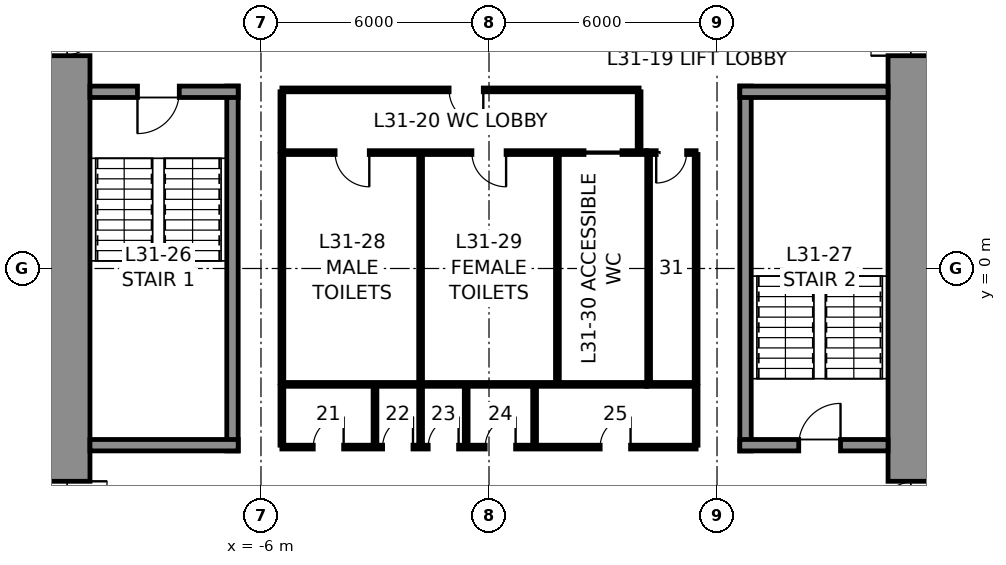
"""IFC4 building model, lengths in metres.
Left out: names, types, materials, properties, quantities, classifications, styles, units other than length and angle.
Written with IfcOpenShell. Run it as: python <this file> out.ifc"""

import sys

from ifc_helpers import new_model, si_unit, direction, frame, frame_2d, origin, place, context, subcontext, project, spatial, rectangle, extrude, element, fill, save


model = new_model("IFC4")
c1 = context("Model", 3, precision=1e-05, world=origin(), true_north=direction((0.0, 1.0)))
c2 = subcontext(c1, "Body", "Model", "MODEL_VIEW")
j1 = project(units=[si_unit("LENGTHUNIT", "METRE"), si_unit("PLANEANGLEUNIT", "RADIAN")], contexts=[c1])
p1 = place(None, origin())
s1 = spatial("IfcSite", under=j1, at=p1, CompositionType="ELEMENT")
p2 = place(p1, origin())
s2 = spatial("IfcBuilding", under=s1, at=p2, CompositionType="ELEMENT")
p3 = place(p2, frame((0.0, 0.0, 151.8)))
s3 = spatial("IfcBuildingStorey", under=s2, at=p3, CompositionType="ELEMENT", Elevation=151.8)
p4 = place(p3, frame((11.25, 10.5, 0.0), z_axis=(0.0, 0.0, 1.0), x_axis=(0.0, -1.0, 0.0)))
e1 = element("IfcWall", 1, at=p4, inside=s3, PredefinedType="SHEAR", context=c2, shape_type="SweptSolid", body=[
    extrude(rectangle(XDim=21.0, YDim=1.5, at=frame_2d((10.5, 0.0))), origin(), (0.0, 0.0, 1.0), 4.0),
])
p5 = place(p4, frame((3.7, 0.0, 0.0)))
e2 = element("IfcOpeningElement", 2, at=p5, cuts=e1, PredefinedType="OPENING", context=c2, shape_type="SweptSolid", body=[
    extrude(rectangle(XDim=1.2, YDim=2.3, at=frame_2d((0.6, 1.15))), frame((0.0, 0.76, 0.0), z_axis=(0.0, -1.0, 0.0), x_axis=(1.0, 0.0, 0.0)), (0.0, 0.0, 1.0), 1.52),
])
p6 = place(p4, frame((16.1, 0.0, 0.0)))
e3 = element("IfcOpeningElement", 3, at=p6, cuts=e1, PredefinedType="OPENING", context=c2, shape_type="SweptSolid", body=[
    extrude(rectangle(XDim=1.2, YDim=2.3, at=frame_2d((0.6, 1.15))), frame((0.0, 0.76, 0.0), z_axis=(0.0, -1.0, 0.0), x_axis=(1.0, 0.0, 0.0)), (0.0, 0.0, 1.0), 1.52),
])
p7 = place(p3, frame((-11.25, -10.5, 0.0), z_axis=(0.0, 0.0, 1.0), x_axis=(0.0, 1.0, 0.0)))
e4 = element("IfcWall", 4, at=p7, inside=s3, PredefinedType="SHEAR", context=c2, shape_type="SweptSolid", body=[
    extrude(rectangle(XDim=21.0, YDim=1.5, at=frame_2d((10.5, 0.0))), origin(), (0.0, 0.0, 1.0), 4.0),
])
p8 = place(p7, frame((16.1, 0.0, 0.0)))
e5 = element("IfcOpeningElement", 5, at=p8, cuts=e4, PredefinedType="OPENING", context=c2, shape_type="SweptSolid", body=[
    extrude(rectangle(XDim=1.2, YDim=2.3, at=frame_2d((0.6, 1.15))), frame((0.0, 0.76, 0.0), z_axis=(0.0, -1.0, 0.0), x_axis=(1.0, 0.0, 0.0)), (0.0, 0.0, 1.0), 1.52),
])
p9 = place(p7, frame((3.7, 0.0, 0.0)))
e6 = element("IfcOpeningElement", 6, at=p9, cuts=e4, PredefinedType="OPENING", context=c2, shape_type="SweptSolid", body=[
    extrude(rectangle(XDim=1.2, YDim=2.3, at=frame_2d((0.6, 1.15))), frame((0.0, 0.76, 0.0), z_axis=(0.0, -1.0, 0.0), x_axis=(1.0, 0.0, 0.0)), (0.0, 0.0, 1.0), 1.52),
])
p10 = place(p3, frame((-6.75, -4.8, 0.0), z_axis=(0.0, 0.0, 1.0), x_axis=(0.0, 1.0, 0.0)))
e7 = element("IfcWall", 7, at=p10, inside=s3, PredefinedType="SOLIDWALL", context=c2, shape_type="SweptSolid", body=[
    extrude(rectangle(XDim=9.6, YDim=0.3, at=frame_2d((4.8, 0.0))), origin(), (0.0, 0.0, 1.0), 3.75),
])
p11 = place(p3, frame((-10.5, 4.65, 0.0), z_axis=(0.0, 0.0, 1.0), x_axis=(1.0, 0.0, 0.0)))
e8 = element("IfcWall", 8, at=p11, inside=s3, PredefinedType="SOLIDWALL", context=c2, shape_type="SweptSolid", body=[
    extrude(rectangle(XDim=3.9, YDim=0.3, at=frame_2d((1.95, 0.0))), origin(), (0.0, 0.0, 1.0), 3.75),
])
p12 = place(p11, frame((1.25, 0.0, 0.0)))
e9 = element("IfcOpeningElement", 9, at=p12, cuts=e8, PredefinedType="OPENING", context=c2, shape_type="SweptSolid", body=[
    extrude(rectangle(XDim=1.1, YDim=2.3, at=frame_2d((0.55, 1.15))), frame((0.0, 0.16, 0.0), z_axis=(0.0, -1.0, 0.0), x_axis=(1.0, 0.0, 0.0)), (0.0, 0.0, 1.0), 0.32),
])
p13 = place(p3, frame((-6.6, -4.65, 0.0), z_axis=(0.0, 0.0, 1.0), x_axis=(-1.0, 0.0, 0.0)))
e10 = element("IfcWall", 10, at=p13, inside=s3, PredefinedType="SOLIDWALL", context=c2, shape_type="SweptSolid", body=[
    extrude(rectangle(XDim=3.9, YDim=0.3, at=frame_2d((1.95, 0.0))), origin(), (0.0, 0.0, 1.0), 3.75),
])
p14 = place(p3, frame((6.75, -4.8, 0.0), z_axis=(0.0, 0.0, 1.0), x_axis=(0.0, 1.0, 0.0)))
e11 = element("IfcWall", 11, at=p14, inside=s3, PredefinedType="SOLIDWALL", context=c2, shape_type="SweptSolid", body=[
    extrude(rectangle(XDim=9.6, YDim=0.3, at=frame_2d((4.8, 0.0))), origin(), (0.0, 0.0, 1.0), 3.75),
])
p15 = place(p3, frame((6.6, 4.65, 0.0), z_axis=(0.0, 0.0, 1.0), x_axis=(1.0, 0.0, 0.0)))
e12 = element("IfcWall", 12, at=p15, inside=s3, PredefinedType="SOLIDWALL", context=c2, shape_type="SweptSolid", body=[
    extrude(rectangle(XDim=3.9, YDim=0.3, at=frame_2d((1.95, 0.0))), origin(), (0.0, 0.0, 1.0), 3.75),
])
p16 = place(p3, frame((10.5, -4.65, 0.0), z_axis=(0.0, 0.0, 1.0), x_axis=(-1.0, 0.0, 0.0)))
e13 = element("IfcWall", 13, at=p16, inside=s3, PredefinedType="SOLIDWALL", context=c2, shape_type="SweptSolid", body=[
    extrude(rectangle(XDim=3.9, YDim=0.3, at=frame_2d((1.95, 0.0))), origin(), (0.0, 0.0, 1.0), 3.75),
])
p17 = place(p16, frame((1.25, 0.0, 0.0)))
e14 = element("IfcOpeningElement", 14, at=p17, cuts=e13, PredefinedType="OPENING", context=c2, shape_type="SweptSolid", body=[
    extrude(rectangle(XDim=1.1, YDim=2.3, at=frame_2d((0.55, 1.15))), frame((0.0, 0.16, 0.0), z_axis=(0.0, -1.0, 0.0), x_axis=(1.0, 0.0, 0.0)), (0.0, 0.0, 1.0), 0.32),
])
p18 = place(p3, frame((-5.45, 3.05, 0.0), z_axis=(0.0, 0.0, 1.0), x_axis=(1.0, 0.0, 0.0)))
e15 = element("IfcWall", 15, at=p18, inside=s3, PredefinedType="PARTITIONING", context=c2, shape_type="SweptSolid", body=[
    extrude(rectangle(XDim=9.6, YDim=0.1, at=frame_2d((4.8, 0.0))), origin(), (0.0, 0.0, 1.0), 3.75),
])
p19 = place(p18, frame((1.4, 0.0, 0.0)))
e16 = element("IfcOpeningElement", 16, at=p19, cuts=e15, PredefinedType="OPENING", context=c2, shape_type="SweptSolid", body=[
    extrude(rectangle(XDim=0.9, YDim=2.3, at=frame_2d((0.45, 1.15))), frame((0.0, 0.06, 0.0), z_axis=(0.0, -1.0, 0.0), x_axis=(1.0, 0.0, 0.0)), (0.0, 0.0, 1.0), 0.12),
])
p20 = place(p18, frame((5.0, 0.0, 0.0)))
e17 = element("IfcOpeningElement", 17, at=p20, cuts=e15, PredefinedType="OPENING", context=c2, shape_type="SweptSolid", body=[
    extrude(rectangle(XDim=0.9, YDim=2.3, at=frame_2d((0.45, 1.15))), frame((0.0, 0.06, 0.0), z_axis=(0.0, -1.0, 0.0), x_axis=(1.0, 0.0, 0.0)), (0.0, 0.0, 1.0), 0.12),
])
p21 = place(p18, frame((7.95, 0.0, 0.0)))
e18 = element("IfcOpeningElement", 18, at=p21, cuts=e15, PredefinedType="OPENING", context=c2, shape_type="SweptSolid", body=[
    extrude(rectangle(XDim=1.0, YDim=2.3, at=frame_2d((0.5, 1.15))), frame((0.0, 0.06, 0.0), z_axis=(0.0, -1.0, 0.0), x_axis=(1.0, 0.0, 0.0)), (0.0, 0.0, 1.0), 0.12),
])
p22 = place(p3, frame((4.15, 3.05, 0.0), z_axis=(0.0, 0.0, 1.0), x_axis=(1.0, 0.0, 0.0)))
e19 = element("IfcWall", 19, at=p22, inside=s3, PredefinedType="PARTITIONING", context=c2, shape_type="SweptSolid", body=[
    extrude(rectangle(XDim=1.3, YDim=0.1, at=frame_2d((0.65, 0.0))), origin(), (0.0, 0.0, 1.0), 3.75),
])
p23 = place(p22, frame((0.25, 0.0, 0.0)))
e20 = element("IfcOpeningElement", 20, at=p23, cuts=e19, PredefinedType="OPENING", context=c2, shape_type="SweptSolid", body=[
    extrude(rectangle(XDim=0.8, YDim=2.3, at=frame_2d((0.4, 1.15))), frame((0.0, 0.06, 0.0), z_axis=(0.0, -1.0, 0.0), x_axis=(1.0, 0.0, 0.0)), (0.0, 0.0, 1.0), 0.12),
])
p24 = place(p3, frame((4.15, -3.05, 0.0), z_axis=(0.0, 0.0, 1.0), x_axis=(-1.0, 0.0, 0.0)))
e21 = element("IfcWall", 21, at=p24, inside=s3, PredefinedType="PARTITIONING", context=c2, shape_type="SweptSolid", body=[
    extrude(rectangle(XDim=9.6, YDim=0.1, at=frame_2d((4.8, 0.0))), origin(), (0.0, 0.0, 1.0), 3.75),
])
p25 = place(p3, frame((5.45, -3.05, 0.0), z_axis=(0.0, 0.0, 1.0), x_axis=(-1.0, 0.0, 0.0)))
e22 = element("IfcWall", 22, at=p25, inside=s3, PredefinedType="PARTITIONING", context=c2, shape_type="SweptSolid", body=[
    extrude(rectangle(XDim=1.3, YDim=0.1, at=frame_2d((0.65, 0.0))), origin(), (0.0, 0.0, 1.0), 3.75),
])
for number, where, z_axis, x_axis in (
    (23, (5.45, 3.0, 0.0), (0.0, 0.0, 1.0), (0.0, -1.0, 0.0)),
    (24, (-5.45, -3.0, 0.0), (0.0, 0.0, 1.0), (0.0, 1.0, 0.0)),
    (25, (-1.8, -3.0, 0.0), (0.0, 0.0, 1.0), (0.0, 1.0, 0.0)),
    (26, (1.8, -3.0, 0.0), (0.0, 0.0, 1.0), (0.0, 1.0, 0.0)),
    (27, (4.2, -3.0, 0.0), (0.0, 0.0, 1.0), (0.0, 1.0, 0.0)),
):
    element("IfcWall", number, at=place(p3, frame(where, z_axis=z_axis, x_axis=x_axis)), inside=s3, PredefinedType="PARTITIONING", context=c2, shape_type="SweptSolid", body=[
        extrude(rectangle(XDim=6.0, YDim=0.1, at=frame_2d((3.0, 0.0))), origin(), (0.0, 0.0, 1.0), 3.75),
    ])
p26 = place(p3, frame((-5.45, 4.7, 0.0), z_axis=(0.0, 0.0, 1.0), x_axis=(1.0, 0.0, 0.0)))
e28 = element("IfcWall", 28, at=p26, inside=s3, PredefinedType="PARTITIONING", context=c2, shape_type="SweptSolid", body=[
    extrude(rectangle(XDim=9.4, YDim=0.1, at=frame_2d((4.7, 0.0))), origin(), (0.0, 0.0, 1.0), 3.75),
])
p27 = place(p26, frame((4.4, 0.0, 0.0)))
e29 = element("IfcOpeningElement", 29, at=p27, cuts=e28, PredefinedType="OPENING", context=c2, shape_type="SweptSolid", body=[
    extrude(rectangle(XDim=0.9, YDim=2.3, at=frame_2d((0.45, 1.15))), frame((0.0, 0.06, 0.0), z_axis=(0.0, -1.0, 0.0), x_axis=(1.0, 0.0, 0.0)), (0.0, 0.0, 1.0), 0.12),
])
for number, where, z_axis, x_axis in (
    (30, (-5.45, 3.1, 0.0), (0.0, 0.0, 1.0), (0.0, 1.0, 0.0)),
    (31, (3.95, 3.1, 0.0), (0.0, 0.0, 1.0), (0.0, 1.0, 0.0)),
):
    element("IfcWall", number, at=place(p3, frame(where, z_axis=z_axis, x_axis=x_axis)), inside=s3, PredefinedType="PARTITIONING", context=c2, shape_type="SweptSolid", body=[
        extrude(rectangle(XDim=1.55, YDim=0.1, at=frame_2d((0.775, 0.0))), origin(), (0.0, 0.0, 1.0), 3.75),
    ])
p28 = place(p3, frame((5.45, -4.7, 0.0), z_axis=(0.0, 0.0, 1.0), x_axis=(-1.0, 0.0, 0.0)))
e32 = element("IfcWall", 32, at=p28, inside=s3, PredefinedType="PARTITIONING", context=c2, shape_type="SweptSolid", body=[
    extrude(rectangle(XDim=10.9, YDim=0.1, at=frame_2d((5.45, 0.0))), origin(), (0.0, 0.0, 1.0), 3.75),
])
p29 = place(p28, frame((9.275, 0.0, 0.0)))
e33 = element("IfcOpeningElement", 33, at=p29, cuts=e32, PredefinedType="OPENING", context=c2, shape_type="SweptSolid", body=[
    extrude(rectangle(XDim=0.8, YDim=2.3, at=frame_2d((0.4, 1.15))), frame((0.0, 0.06, 0.0), z_axis=(0.0, -1.0, 0.0), x_axis=(1.0, 0.0, 0.0)), (0.0, 0.0, 1.0), 0.12),
])
p30 = place(p28, frame((7.45, 0.0, 0.0)))
e34 = element("IfcOpeningElement", 34, at=p30, cuts=e32, PredefinedType="OPENING", context=c2, shape_type="SweptSolid", body=[
    extrude(rectangle(XDim=0.8, YDim=2.3, at=frame_2d((0.4, 1.15))), frame((0.0, 0.06, 0.0), z_axis=(0.0, -1.0, 0.0), x_axis=(1.0, 0.0, 0.0)), (0.0, 0.0, 1.0), 0.12),
])
p31 = place(p28, frame((6.25, 0.0, 0.0)))
e35 = element("IfcOpeningElement", 35, at=p31, cuts=e32, PredefinedType="OPENING", context=c2, shape_type="SweptSolid", body=[
    extrude(rectangle(XDim=0.8, YDim=2.3, at=frame_2d((0.4, 1.15))), frame((0.0, 0.06, 0.0), z_axis=(0.0, -1.0, 0.0), x_axis=(1.0, 0.0, 0.0)), (0.0, 0.0, 1.0), 0.12),
])
p32 = place(p28, frame((4.75, 0.0, 0.0)))
e36 = element("IfcOpeningElement", 36, at=p32, cuts=e32, PredefinedType="OPENING", context=c2, shape_type="SweptSolid", body=[
    extrude(rectangle(XDim=0.8, YDim=2.3, at=frame_2d((0.4, 1.15))), frame((0.0, 0.06, 0.0), z_axis=(0.0, -1.0, 0.0), x_axis=(1.0, 0.0, 0.0)), (0.0, 0.0, 1.0), 0.12),
])
p33 = place(p28, frame((1.725, 0.0, 0.0)))
e37 = element("IfcOpeningElement", 37, at=p33, cuts=e32, PredefinedType="OPENING", context=c2, shape_type="SweptSolid", body=[
    extrude(rectangle(XDim=0.8, YDim=2.3, at=frame_2d((0.4, 1.15))), frame((0.0, 0.06, 0.0), z_axis=(0.0, -1.0, 0.0), x_axis=(1.0, 0.0, 0.0)), (0.0, 0.0, 1.0), 0.12),
])
for number, where, z_axis, x_axis in (
    (38, (-5.45, -3.1, 0.0), (0.0, 0.0, 1.0), (0.0, -1.0, 0.0)),
    (39, (5.45, -3.1, 0.0), (0.0, 0.0, 1.0), (0.0, -1.0, 0.0)),
    (40, (-3.0, -3.1, 0.0), (0.0, 0.0, 1.0), (0.0, -1.0, 0.0)),
    (41, (-1.8, -3.1, 0.0), (0.0, 0.0, 1.0), (0.0, -1.0, 0.0)),
    (42, (-0.6, -3.1, 0.0), (0.0, 0.0, 1.0), (0.0, -1.0, 0.0)),
    (43, (1.2, -3.1, 0.0), (0.0, 0.0, 1.0), (0.0, -1.0, 0.0)),
):
    element("IfcWall", number, at=place(p3, frame(where, z_axis=z_axis, x_axis=x_axis)), inside=s3, PredefinedType="PARTITIONING", context=c2, shape_type="SweptSolid", body=[
        extrude(rectangle(XDim=1.55, YDim=0.1, at=frame_2d((0.775, 0.0))), origin(), (0.0, 0.0, 1.0), 3.75),
    ])
p34 = place(p12, frame((1.1, 0.0, 0.0), z_axis=(0.0, 0.0, 1.0), x_axis=(-1.0, 0.0, 0.0)))
e44 = element("IfcDoor", 44, at=p34, inside=s3, OperationType="SINGLE_SWING_RIGHT", PredefinedType="DOOR", context=c2, shape_type="SweptSolid", body=[
    extrude(rectangle(XDim=1.1, YDim=2.3, at=frame_2d((0.55, 1.15))), frame((0.0, 0.025, 0.0), z_axis=(0.0, -1.0, 0.0), x_axis=(1.0, 0.0, 0.0)), (0.0, 0.0, 1.0), 0.05),
])
fill(e9, e44)
p35 = place(p17, frame((1.1, 0.0, 0.0), z_axis=(0.0, 0.0, 1.0), x_axis=(-1.0, 0.0, 0.0)))
e45 = element("IfcDoor", 45, at=p35, inside=s3, OperationType="SINGLE_SWING_RIGHT", PredefinedType="DOOR", context=c2, shape_type="SweptSolid", body=[
    extrude(rectangle(XDim=1.1, YDim=2.3, at=frame_2d((0.55, 1.15))), frame((0.0, 0.025, 0.0), z_axis=(0.0, -1.0, 0.0), x_axis=(1.0, 0.0, 0.0)), (0.0, 0.0, 1.0), 0.05),
])
fill(e14, e45)
p36 = place(p19, frame((0.9, 0.0, 0.0), z_axis=(0.0, 0.0, 1.0), x_axis=(-1.0, 0.0, 0.0)))
e46 = element("IfcDoor", 46, at=p36, inside=s3, OperationType="SINGLE_SWING_LEFT", PredefinedType="DOOR", context=c2, shape_type="SweptSolid", body=[
    extrude(rectangle(XDim=0.9, YDim=2.3, at=frame_2d((0.45, 1.15))), frame((0.0, 0.025, 0.0), z_axis=(0.0, -1.0, 0.0), x_axis=(1.0, 0.0, 0.0)), (0.0, 0.0, 1.0), 0.05),
])
fill(e16, e46)
p37 = place(p20, frame((0.9, 0.0, 0.0), z_axis=(0.0, 0.0, 1.0), x_axis=(-1.0, 0.0, 0.0)))
e47 = element("IfcDoor", 47, at=p37, inside=s3, OperationType="SINGLE_SWING_LEFT", PredefinedType="DOOR", context=c2, shape_type="SweptSolid", body=[
    extrude(rectangle(XDim=0.9, YDim=2.3, at=frame_2d((0.45, 1.15))), frame((0.0, 0.025, 0.0), z_axis=(0.0, -1.0, 0.0), x_axis=(1.0, 0.0, 0.0)), (0.0, 0.0, 1.0), 0.05),
])
fill(e17, e47)
p38 = place(p21, frame((1.0, 0.0, 0.0), z_axis=(0.0, 0.0, 1.0), x_axis=(-1.0, 0.0, 0.0)))
e48 = element("IfcDoor", 48, at=p38, inside=s3, OperationType="SLIDING_TO_LEFT", PredefinedType="DOOR", context=c2, shape_type="SweptSolid", body=[
    extrude(rectangle(XDim=1.0, YDim=2.3, at=frame_2d((0.5, 1.15))), frame((0.0, 0.025, 0.0), z_axis=(0.0, -1.0, 0.0), x_axis=(1.0, 0.0, 0.0)), (0.0, 0.0, 1.0), 0.05),
])
fill(e18, e48)
p39 = place(p23, frame((0.8, 0.0, 0.0), z_axis=(0.0, 0.0, 1.0), x_axis=(-1.0, 0.0, 0.0)))
e49 = element("IfcDoor", 49, at=p39, inside=s3, OperationType="SINGLE_SWING_RIGHT", PredefinedType="DOOR", context=c2, shape_type="SweptSolid", body=[
    extrude(rectangle(XDim=0.8, YDim=2.3, at=frame_2d((0.4, 1.15))), frame((0.0, 0.025, 0.0), z_axis=(0.0, -1.0, 0.0), x_axis=(1.0, 0.0, 0.0)), (0.0, 0.0, 1.0), 0.05),
])
fill(e20, e49)
p40 = place(p27, frame((0.9, 0.0, 0.0), z_axis=(0.0, 0.0, 1.0), x_axis=(-1.0, 0.0, 0.0)))
e50 = element("IfcDoor", 50, at=p40, inside=s3, OperationType="SINGLE_SWING_LEFT", PredefinedType="DOOR", context=c2, shape_type="SweptSolid", body=[
    extrude(rectangle(XDim=0.9, YDim=2.3, at=frame_2d((0.45, 1.15))), frame((0.0, 0.025, 0.0), z_axis=(0.0, -1.0, 0.0), x_axis=(1.0, 0.0, 0.0)), (0.0, 0.0, 1.0), 0.05),
])
fill(e29, e50)
p41 = place(p29, frame((0.8, 0.0, 0.0), z_axis=(0.0, 0.0, 1.0), x_axis=(-1.0, 0.0, 0.0)))
e51 = element("IfcDoor", 51, at=p41, inside=s3, OperationType="SINGLE_SWING_RIGHT", PredefinedType="DOOR", context=c2, shape_type="SweptSolid", body=[
    extrude(rectangle(XDim=0.8, YDim=2.3, at=frame_2d((0.4, 1.15))), frame((0.0, 0.025, 0.0), z_axis=(0.0, -1.0, 0.0), x_axis=(1.0, 0.0, 0.0)), (0.0, 0.0, 1.0), 0.05),
])
fill(e33, e51)
p42 = place(p30, frame((0.8, 0.0, 0.0), z_axis=(0.0, 0.0, 1.0), x_axis=(-1.0, 0.0, 0.0)))
e52 = element("IfcDoor", 52, at=p42, inside=s3, OperationType="SINGLE_SWING_RIGHT", PredefinedType="DOOR", context=c2, shape_type="SweptSolid", body=[
    extrude(rectangle(XDim=0.8, YDim=2.3, at=frame_2d((0.4, 1.15))), frame((0.0, 0.025, 0.0), z_axis=(0.0, -1.0, 0.0), x_axis=(1.0, 0.0, 0.0)), (0.0, 0.0, 1.0), 0.05),
])
fill(e34, e52)
p43 = place(p31, frame((0.8, 0.0, 0.0), z_axis=(0.0, 0.0, 1.0), x_axis=(-1.0, 0.0, 0.0)))
e53 = element("IfcDoor", 53, at=p43, inside=s3, OperationType="SINGLE_SWING_RIGHT", PredefinedType="DOOR", context=c2, shape_type="SweptSolid", body=[
    extrude(rectangle(XDim=0.8, YDim=2.3, at=frame_2d((0.4, 1.15))), frame((0.0, 0.025, 0.0), z_axis=(0.0, -1.0, 0.0), x_axis=(1.0, 0.0, 0.0)), (0.0, 0.0, 1.0), 0.05),
])
fill(e35, e53)
p44 = place(p32, frame((0.8, 0.0, 0.0), z_axis=(0.0, 0.0, 1.0), x_axis=(-1.0, 0.0, 0.0)))
e54 = element("IfcDoor", 54, at=p44, inside=s3, OperationType="SINGLE_SWING_RIGHT", PredefinedType="DOOR", context=c2, shape_type="SweptSolid", body=[
    extrude(rectangle(XDim=0.8, YDim=2.3, at=frame_2d((0.4, 1.15))), frame((0.0, 0.025, 0.0), z_axis=(0.0, -1.0, 0.0), x_axis=(1.0, 0.0, 0.0)), (0.0, 0.0, 1.0), 0.05),
])
fill(e36, e54)
p45 = place(p33, frame((0.8, 0.0, 0.0), z_axis=(0.0, 0.0, 1.0), x_axis=(-1.0, 0.0, 0.0)))
e55 = element("IfcDoor", 55, at=p45, inside=s3, OperationType="SINGLE_SWING_RIGHT", PredefinedType="DOOR", context=c2, shape_type="SweptSolid", body=[
    extrude(rectangle(XDim=0.8, YDim=2.3, at=frame_2d((0.4, 1.15))), frame((0.0, 0.025, 0.0), z_axis=(0.0, -1.0, 0.0), x_axis=(1.0, 0.0, 0.0)), (0.0, 0.0, 1.0), 0.05),
])
fill(e37, e55)
p46 = place(p8, frame((1.2, 0.0, 0.0), z_axis=(0.0, 0.0, 1.0), x_axis=(-1.0, 0.0, 0.0)))
e56 = element("IfcDoor", 56, at=p46, inside=s3, OperationType="SINGLE_SWING_LEFT", PredefinedType="DOOR", context=c2, shape_type="SweptSolid", body=[
    extrude(rectangle(XDim=1.2, YDim=2.3, at=frame_2d((0.6, 1.15))), frame((0.0, 0.025, 0.0), z_axis=(0.0, -1.0, 0.0), x_axis=(1.0, 0.0, 0.0)), (0.0, 0.0, 1.0), 0.05),
])
fill(e5, e56)
p47 = place(p9, frame((1.2, 0.0, 0.0), z_axis=(0.0, 0.0, 1.0), x_axis=(-1.0, 0.0, 0.0)))
e57 = element("IfcDoor", 57, at=p47, inside=s3, OperationType="SINGLE_SWING_LEFT", PredefinedType="DOOR", context=c2, shape_type="SweptSolid", body=[
    extrude(rectangle(XDim=1.2, YDim=2.3, at=frame_2d((0.6, 1.15))), frame((0.0, 0.025, 0.0), z_axis=(0.0, -1.0, 0.0), x_axis=(1.0, 0.0, 0.0)), (0.0, 0.0, 1.0), 0.05),
])
fill(e6, e57)
p48 = place(p5, frame((1.2, 0.0, 0.0), z_axis=(0.0, 0.0, 1.0), x_axis=(-1.0, 0.0, 0.0)))
e58 = element("IfcDoor", 58, at=p48, inside=s3, OperationType="SINGLE_SWING_LEFT", PredefinedType="DOOR", context=c2, shape_type="SweptSolid", body=[
    extrude(rectangle(XDim=1.2, YDim=2.3, at=frame_2d((0.6, 1.15))), frame((0.0, 0.025, 0.0), z_axis=(0.0, -1.0, 0.0), x_axis=(1.0, 0.0, 0.0)), (0.0, 0.0, 1.0), 0.05),
])
fill(e2, e58)
p49 = place(p6, frame((1.2, 0.0, 0.0), z_axis=(0.0, 0.0, 1.0), x_axis=(-1.0, 0.0, 0.0)))
e59 = element("IfcDoor", 59, at=p49, inside=s3, OperationType="SINGLE_SWING_LEFT", PredefinedType="DOOR", context=c2, shape_type="SweptSolid", body=[
    extrude(rectangle(XDim=1.2, YDim=2.3, at=frame_2d((0.6, 1.15))), frame((0.0, 0.025, 0.0), z_axis=(0.0, -1.0, 0.0), x_axis=(1.0, 0.0, 0.0)), (0.0, 0.0, 1.0), 0.05),
])
fill(e3, e59)
save(model, sys.argv[1])
